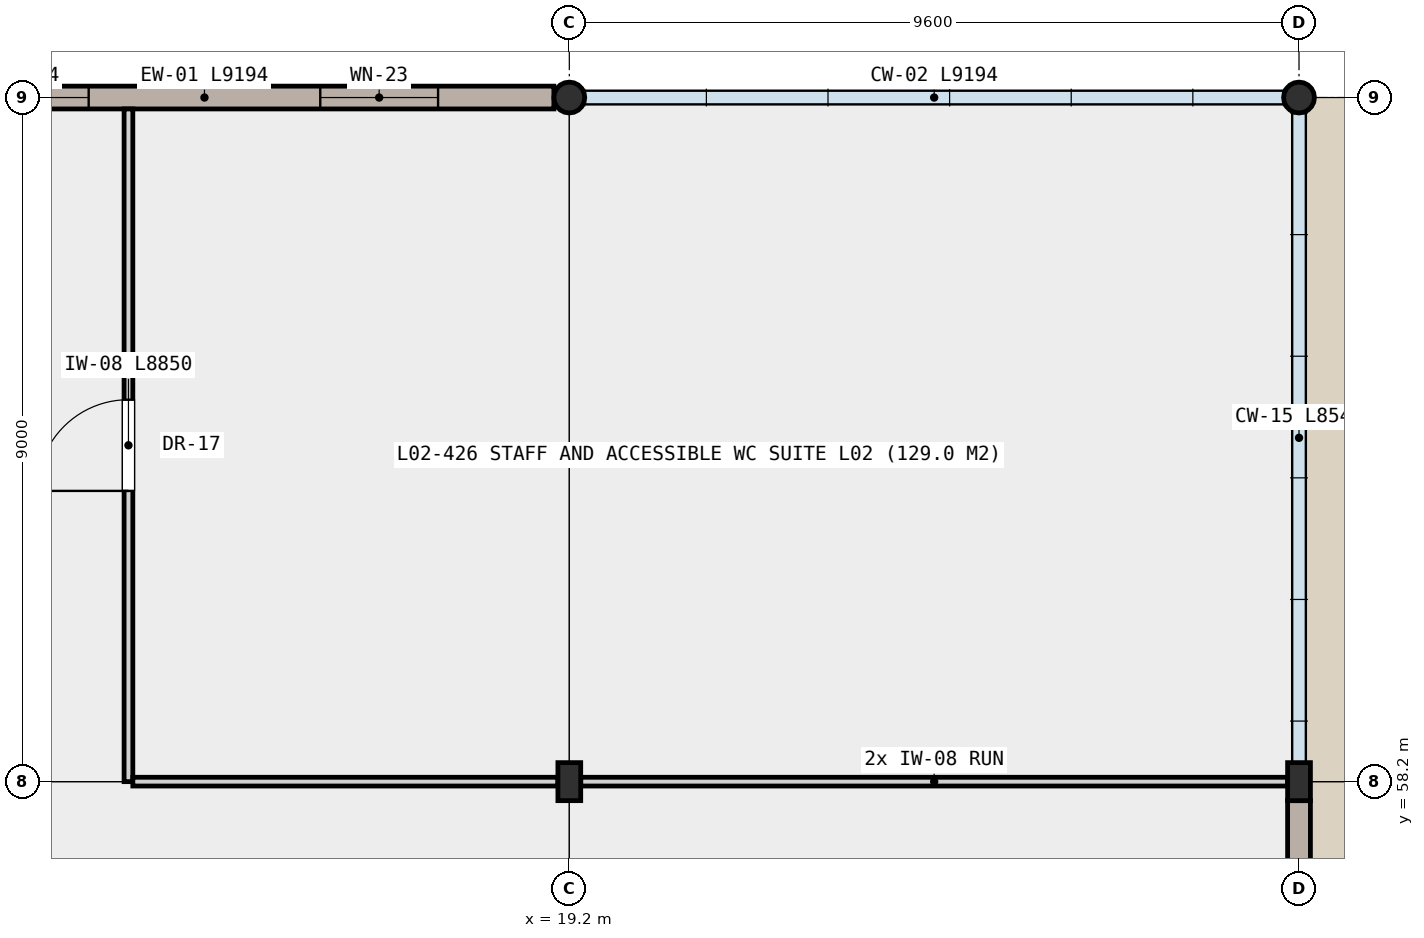
"""IFC4 building model, lengths in metres.
Left out: names, types, materials, properties, quantities, classifications, styles, units other than length and angle.
Written with IfcOpenShell. Run it as: python <this file> out.ifc"""

import sys

from ifc_helpers import new_model, si_unit, direction, frame, frame_2d, origin, origin_2d, place, context, subcontext, project, spatial, rectangle, hollow_circle, i_section, extrude, element, fill, save


model = new_model("IFC4")
c1 = context("Model", 3, precision=1e-05, world=origin(), true_north=direction((0.0, 1.0)))
c2 = subcontext(c1, "Body", "Model", "MODEL_VIEW")
j1 = project(units=[si_unit("LENGTHUNIT", "METRE"), si_unit("PLANEANGLEUNIT", "RADIAN")], contexts=[c1])
p1 = place(None, origin())
s1 = spatial("IfcSite", under=j1, at=p1, CompositionType="ELEMENT")
p2 = place(p1, origin())
s2 = spatial("IfcBuilding", under=s1, at=p2, CompositionType="ELEMENT")
p3 = place(p2, frame((0.0, 0.0, 10.2)))
s3 = spatial("IfcBuildingStorey", under=s2, at=p3, CompositionType="ELEMENT", Elevation=10.2)
p4 = place(p3, frame((19.2, 58.2, 0.0), z_axis=(0.0, 0.0, 1.0), x_axis=(1.0, 0.0, 0.0)))
e1 = element("IfcColumn", 1, at=p4, inside=s3, PredefinedType="COLUMN", context=c2, shape_type="SweptSolid", body=[
    extrude(i_section(OverallWidth=0.3, OverallDepth=0.5, WebThickness=0.014, FlangeThickness=0.028, FilletRadius=0.027, at=origin_2d()), origin(), (0.0, 0.0, 1.0), 4.2),
])
p5 = place(p3, frame((19.2, 67.2, 0.0), z_axis=(0.0, 0.0, 1.0), x_axis=(1.0, 0.0, 0.0)))
e2 = element("IfcColumn", 2, at=p5, inside=s3, PredefinedType="COLUMN", context=c2, shape_type="SweptSolid", body=[
    extrude(hollow_circle(Radius=0.203, WallThickness=0.02, at=origin_2d()), origin(), (0.0, 0.0, 1.0), 4.188),
])
p6 = place(p3, frame((28.8, 58.2, 0.0), z_axis=(0.0, 0.0, 1.0), x_axis=(1.0, 0.0, 0.0)))
e3 = element("IfcColumn", 3, at=p6, inside=s3, PredefinedType="COLUMN", context=c2, shape_type="SweptSolid", body=[
    extrude(i_section(OverallWidth=0.3, OverallDepth=0.5, WebThickness=0.014, FlangeThickness=0.028, FilletRadius=0.027, at=origin_2d()), origin(), (0.0, 0.0, 1.0), 4.2),
])
p7 = place(p3, frame((28.8, 67.2, 0.0), z_axis=(0.0, 0.0, 1.0), x_axis=(1.0, 0.0, 0.0)))
e4 = element("IfcColumn", 4, at=p7, inside=s3, PredefinedType="COLUMN", context=c2, shape_type="SweptSolid", body=[
    extrude(hollow_circle(Radius=0.203, WallThickness=0.02, at=origin_2d()), origin(), (0.0, 0.0, 1.0), 4.188),
])
p8 = place(p3, frame((9.803, 67.2, 0.0), z_axis=(0.0, 0.0, 1.0), x_axis=(1.0, 0.0, 0.0)))
e5 = element("IfcWall", 5, at=p8, inside=s3, PredefinedType="SOLIDWALL", context=c2, shape_type="SweptSolid", body=[
    extrude(rectangle(XDim=9.194, YDim=0.3, at=frame_2d((4.597, 0.0))), origin(), (0.0, 0.0, 1.0), 3.57),
])
p9 = place(p8, frame((1.523, 0.0, 0.85)))
e6 = element("IfcOpeningElement", 6, at=p9, cuts=e5, PredefinedType="OPENING", context=c2, shape_type="SweptSolid", body=[
    extrude(rectangle(XDim=1.55, YDim=1.5, at=frame_2d((0.775, 0.75))), frame((0.0, 0.16, 0.0), z_axis=(0.0, -1.0, 0.0), x_axis=(1.0, 0.0, 0.0)), (0.0, 0.0, 1.0), 0.32),
])
p10 = place(p8, frame((6.12, 0.0, 0.85)))
e7 = element("IfcOpeningElement", 7, at=p10, cuts=e5, PredefinedType="OPENING", context=c2, shape_type="SweptSolid", body=[
    extrude(rectangle(XDim=1.55, YDim=1.85, at=frame_2d((0.775, 0.925))), frame((0.0, 0.16, 0.0), z_axis=(0.0, -1.0, 0.0), x_axis=(1.0, 0.0, 0.0)), (0.0, 0.0, 1.0), 0.32),
])
p11 = place(p3, frame((28.8, 57.95, 0.0), z_axis=(0.0, 0.0, 1.0), x_axis=(0.0, -1.0, 0.0)))
e8 = element("IfcWall", 8, at=p11, inside=s3, PredefinedType="SOLIDWALL", context=c2, shape_type="SweptSolid", body=[
    extrude(rectangle(XDim=8.5, YDim=0.3, at=frame_2d((4.25, 0.0))), origin(), (0.0, 0.0, 1.0), 3.37),
])
p12 = place(p11, frame((1.35, 0.0, 0.85)))
e9 = element("IfcOpeningElement", 9, at=p12, cuts=e8, PredefinedType="OPENING", context=c2, shape_type="SweptSolid", body=[
    extrude(rectangle(XDim=1.55, YDim=2.15, at=frame_2d((0.775, 1.075))), frame((0.0, 0.16, 0.0), z_axis=(0.0, -1.0, 0.0), x_axis=(1.0, 0.0, 0.0)), (0.0, 0.0, 1.0), 0.32),
])
p13 = place(p11, frame((5.55, 0.0, 0.85)))
e10 = element("IfcOpeningElement", 10, at=p13, cuts=e8, PredefinedType="OPENING", context=c2, shape_type="SweptSolid", body=[
    extrude(rectangle(XDim=1.65, YDim=1.5, at=frame_2d((0.825, 0.75))), frame((0.0, 0.16, 0.0), z_axis=(0.0, -1.0, 0.0), x_axis=(1.0, 0.0, 0.0)), (0.0, 0.0, 1.0), 0.32),
])
p14 = place(p3, frame((13.4, 58.2, 0.0), z_axis=(0.0, 0.0, 1.0), x_axis=(0.0, 1.0, 0.0)))
e11 = element("IfcWall", 11, at=p14, inside=s3, PredefinedType="PARTITIONING", context=c2, shape_type="SweptSolid", body=[
    extrude(rectangle(XDim=8.85, YDim=0.115, at=frame_2d((4.425, 0.0))), origin(), (0.0, 0.0, 1.0), 3.95),
])
p15 = place(p14, frame((3.825, 0.0, 0.0)))
e12 = element("IfcOpeningElement", 12, at=p15, cuts=e11, PredefinedType="OPENING", context=c2, shape_type="SweptSolid", body=[
    extrude(rectangle(XDim=1.2, YDim=2.15, at=frame_2d((0.6, 1.075))), frame((0.0, 0.067, 0.0), z_axis=(0.0, -1.0, 0.0), x_axis=(1.0, 0.0, 0.0)), (0.0, 0.0, 1.0), 0.135),
])
p16 = place(p3, frame((19.05, 58.2, 0.0), z_axis=(0.0, 0.0, 1.0), x_axis=(-1.0, 0.0, 0.0)))
e13 = element("IfcWall", 13, at=p16, inside=s3, PredefinedType="PARTITIONING", context=c2, shape_type="SweptSolid", body=[
    extrude(rectangle(XDim=5.593, YDim=0.115, at=frame_2d((2.796, 0.0))), origin(), (0.0, 0.0, 1.0), 3.32),
])
p17 = place(p3, frame((28.65, 58.2, 0.0), z_axis=(0.0, 0.0, 1.0), x_axis=(-1.0, 0.0, 0.0)))
e14 = element("IfcWall", 14, at=p17, inside=s3, PredefinedType="PARTITIONING", context=c2, shape_type="SweptSolid", body=[
    extrude(rectangle(XDim=9.3, YDim=0.115, at=frame_2d((4.65, 0.0))), origin(), (0.0, 0.0, 1.0), 3.32),
])
p18 = place(p9, origin())
e15 = element("IfcWindow", 15, at=p18, inside=s3, PartitioningType="SINGLE_PANEL", PredefinedType="WINDOW", context=c2, shape_type="SweptSolid", body=[
    extrude(rectangle(XDim=1.55, YDim=1.5, at=frame_2d((0.775, 0.75))), frame((0.0, 0.03, 0.0), z_axis=(0.0, -1.0, 0.0), x_axis=(1.0, 0.0, 0.0)), (0.0, 0.0, 1.0), 0.06),
])
fill(e6, e15)
p19 = place(p10, origin())
e16 = element("IfcWindow", 16, at=p19, inside=s3, PartitioningType="SINGLE_PANEL", PredefinedType="WINDOW", context=c2, shape_type="SweptSolid", body=[
    extrude(rectangle(XDim=1.55, YDim=1.85, at=frame_2d((0.775, 0.925))), frame((0.0, 0.03, 0.0), z_axis=(0.0, -1.0, 0.0), x_axis=(1.0, 0.0, 0.0)), (0.0, 0.0, 1.0), 0.06),
])
fill(e7, e16)
p20 = place(p15, origin())
e17 = element("IfcDoor", 17, at=p20, inside=s3, OperationType="SINGLE_SWING_LEFT", PredefinedType="DOOR", context=c2, shape_type="SweptSolid", body=[
    extrude(rectangle(XDim=1.2, YDim=2.15, at=frame_2d((0.6, 1.075))), frame((0.0, 0.025, 0.0), z_axis=(0.0, -1.0, 0.0), x_axis=(1.0, 0.0, 0.0)), (0.0, 0.0, 1.0), 0.05),
])
fill(e12, e17)
save(model, sys.argv[1])
